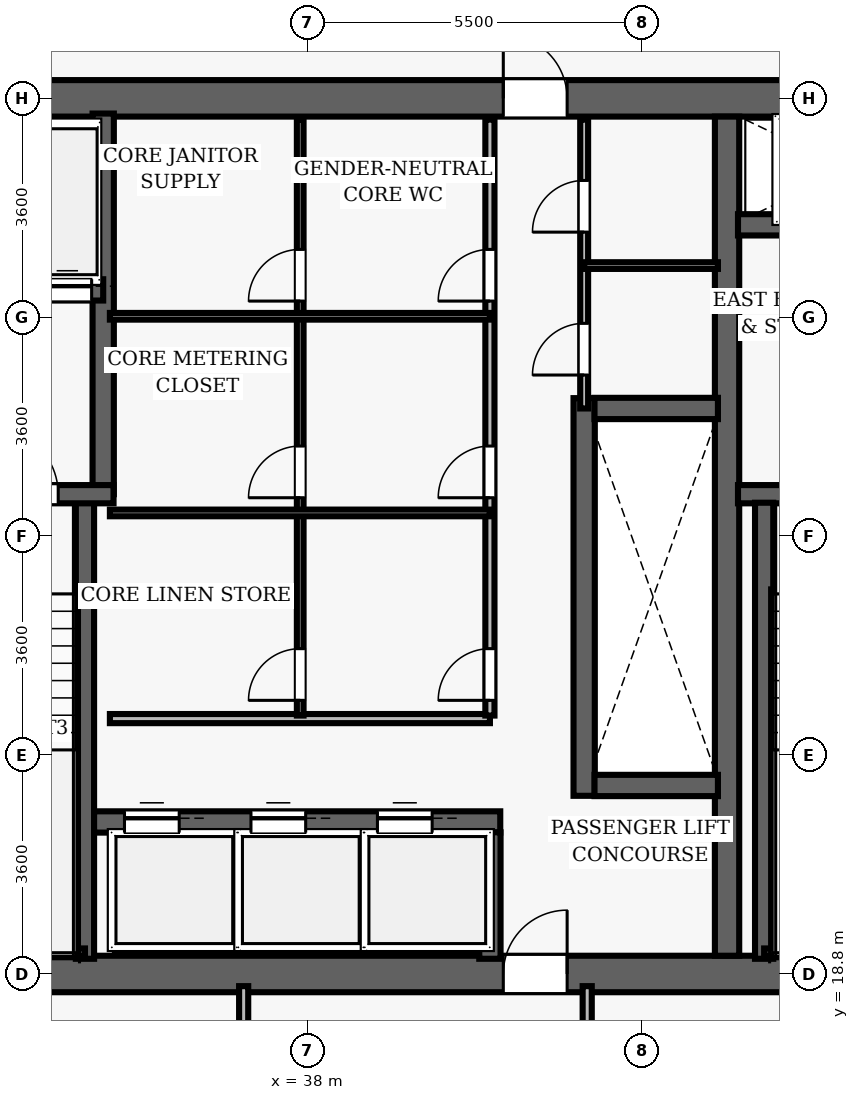
"""IFC4 building model, lengths in metres.
Left out: names, types, materials, properties, quantities, classifications, styles, units other than length and angle.
Written with IfcOpenShell. Run it as: python <this file> out.ifc"""

import sys

from ifc_helpers import new_model, si_unit, direction, frame, frame_2d, origin, place, context, subcontext, project, spatial, rectangle, extrude, element, fill, save


model = new_model("IFC4")
c1 = context("Model", 3, precision=1e-05, world=origin(), true_north=direction((0.0, 1.0)))
c2 = subcontext(c1, "Body", "Model", "MODEL_VIEW")
j1 = project(units=[si_unit("LENGTHUNIT", "METRE"), si_unit("PLANEANGLEUNIT", "RADIAN")], contexts=[c1])
p1 = place(None, origin())
s1 = spatial("IfcSite", under=j1, at=p1, CompositionType="ELEMENT")
p2 = place(p1, origin())
s2 = spatial("IfcBuilding", under=s1, at=p2, CompositionType="ELEMENT")
p3 = place(p2, frame((0.0, 0.0, 155.3)))
s3 = spatial("IfcBuildingStorey", under=s2, at=p3, CompositionType="ELEMENT", Elevation=155.3)
p4 = place(p3, frame((26.7, 18.8, 0.0), z_axis=(0.0, 0.0, 1.0), x_axis=(1.0, 0.0, 0.0)))
e1 = element("IfcWall", 1, at=p4, inside=s3, PredefinedType="SHEAR", context=c2, shape_type="SweptSolid", body=[
    extrude(rectangle(XDim=22.6, YDim=0.6, at=frame_2d((11.3, 0.0))), origin(), (0.0, 0.0, 1.0), 3.5),
])
p5 = place(p4, frame((14.52, 0.0, 0.0)))
e2 = element("IfcOpeningElement", 2, at=p5, cuts=e1, PredefinedType="OPENING", context=c2, shape_type="SweptSolid", body=[
    extrude(rectangle(XDim=1.05, YDim=2.15, at=frame_2d((0.525, 1.075))), frame((0.0, 0.31, 0.0), z_axis=(0.0, -1.0, 0.0), x_axis=(1.0, 0.0, 0.0)), (0.0, 0.0, 1.0), 0.62),
])
p6 = place(p3, frame((26.7, 33.2, 0.0), z_axis=(0.0, 0.0, 1.0), x_axis=(1.0, 0.0, 0.0)))
e3 = element("IfcWall", 3, at=p6, inside=s3, PredefinedType="SHEAR", context=c2, shape_type="SweptSolid", body=[
    extrude(rectangle(XDim=22.6, YDim=0.6, at=frame_2d((11.3, 0.0))), origin(), (0.0, 0.0, 1.0), 3.5),
])
p7 = place(p6, frame((4.62, 0.0, 0.0)))
e4 = element("IfcOpeningElement", 4, at=p7, cuts=e3, PredefinedType="OPENING", context=c2, shape_type="SweptSolid", body=[
    extrude(rectangle(XDim=1.05, YDim=2.15, at=frame_2d((0.525, 1.075))), frame((0.0, 0.31, 0.0), z_axis=(0.0, -1.0, 0.0), x_axis=(1.0, 0.0, 0.0)), (0.0, 0.0, 1.0), 0.62),
])
p8 = place(p6, frame((14.52, 0.0, 0.0)))
e5 = element("IfcOpeningElement", 5, at=p8, cuts=e3, PredefinedType="OPENING", context=c2, shape_type="SweptSolid", body=[
    extrude(rectangle(XDim=1.05, YDim=2.15, at=frame_2d((0.525, 1.075))), frame((0.0, 0.31, 0.0), z_axis=(0.0, -1.0, 0.0), x_axis=(1.0, 0.0, 0.0)), (0.0, 0.0, 1.0), 0.62),
])
p9 = place(p3, frame((44.9, 19.1, 0.0), z_axis=(0.0, 0.0, 1.0), x_axis=(0.0, 1.0, 0.0)))
e6 = element("IfcWall", 6, at=p9, inside=s3, PredefinedType="SHEAR", context=c2, shape_type="SweptSolid", body=[
    extrude(rectangle(XDim=13.8, YDim=0.4, at=frame_2d((6.9, 0.0))), origin(), (0.0, 0.0, 1.0), 3.5),
])
p10 = place(p3, frame((45.08, 26.69, 0.0), z_axis=(0.0, 0.0, 1.0), x_axis=(1.0, 0.0, 0.0)))
e7 = element("IfcWall", 7, at=p10, inside=s3, PredefinedType="SHEAR", context=c2, shape_type="SweptSolid", body=[
    extrude(rectangle(XDim=3.67, YDim=0.3, at=frame_2d((1.835, 0.0))), origin(), (0.0, 0.0, 1.0), 3.5),
])
p11 = place(p10, frame((1.05, 0.0, 0.0)))
e8 = element("IfcOpeningElement", 8, at=p11, cuts=e7, PredefinedType="OPENING", context=c2, shape_type="SweptSolid", body=[
    extrude(rectangle(XDim=1.1, YDim=2.15, at=frame_2d((0.55, 1.075))), frame((0.0, 0.16, 0.0), z_axis=(0.0, -1.0, 0.0), x_axis=(1.0, 0.0, 0.0)), (0.0, 0.0, 1.0), 0.32),
])
p12 = place(p3, frame((45.51, 19.05, 0.0), z_axis=(0.0, 0.0, 1.0), x_axis=(0.0, 1.0, 0.0)))
e9 = element("IfcWall", 9, at=p12, inside=s3, PredefinedType="SHEAR", context=c2, shape_type="SweptSolid", body=[
    extrude(rectangle(XDim=7.5, YDim=0.3, at=frame_2d((3.75, 0.0))), origin(), (0.0, 0.0, 1.0), 3.5),
])
p13 = place(p3, frame((45.51, 19.16, 0.0), z_axis=(0.0, 0.0, 1.0), x_axis=(1.0, 0.0, 0.0)))
e10 = element("IfcWall", 10, at=p13, inside=s3, PredefinedType="SHEAR", context=c2, shape_type="SweptSolid", body=[
    extrude(rectangle(XDim=3.095, YDim=0.12, at=frame_2d((1.547, 0.0))), origin(), (0.0, 0.0, 1.0), 3.5),
])
p14 = place(p3, frame((45.08, 31.12, 0.0), z_axis=(0.0, 0.0, 1.0), x_axis=(1.0, 0.0, 0.0)))
e11 = element("IfcWall", 11, at=p14, inside=s3, PredefinedType="SHEAR", context=c2, shape_type="SweptSolid", body=[
    extrude(rectangle(XDim=3.67, YDim=0.35, at=frame_2d((1.835, 0.0))), origin(), (0.0, 0.0, 1.0), 2.675),
])
p15 = place(p14, frame((1.25, 0.0, 0.0)))
e12 = element("IfcOpeningElement", 12, at=p15, cuts=e11, PredefinedType="OPENING", context=c2, shape_type="SweptSolid", body=[
    extrude(rectangle(XDim=1.1, YDim=2.15, at=frame_2d((0.55, 1.075))), frame((0.0, 0.185, 0.0), z_axis=(0.0, -1.0, 0.0), x_axis=(1.0, 0.0, 0.0)), (0.0, 0.0, 1.0), 0.37),
])
p16 = place(p3, frame((34.34, 19.05, 0.0), z_axis=(0.0, 0.0, 1.0), x_axis=(0.0, 1.0, 0.0)))
e13 = element("IfcWall", 13, at=p16, inside=s3, PredefinedType="SHEAR", context=c2, shape_type="SweptSolid", body=[
    extrude(rectangle(XDim=7.5, YDim=0.3, at=frame_2d((3.75, 0.0))), origin(), (0.0, 0.0, 1.0), 3.5),
])
p17 = place(p3, frame((34.64, 26.69, 0.0), z_axis=(0.0, 0.0, 1.0), x_axis=(0.0, 1.0, 0.0)))
e14 = element("IfcWall", 14, at=p17, inside=s3, PredefinedType="SHEAR", context=c2, shape_type="SweptSolid", body=[
    extrude(rectangle(XDim=6.26, YDim=0.35, at=frame_2d((3.13, 0.0))), origin(), (0.0, 0.0, 1.0), 3.5),
])
p18 = place(p3, frame((31.25, 26.69, 0.0), z_axis=(0.0, 0.0, 1.0), x_axis=(1.0, 0.0, 0.0)))
e15 = element("IfcWall", 15, at=p18, inside=s3, PredefinedType="SHEAR", context=c2, shape_type="SweptSolid", body=[
    extrude(rectangle(XDim=3.56, YDim=0.3, at=frame_2d((1.78, 0.0))), origin(), (0.0, 0.0, 1.0), 3.5),
])
p19 = place(p18, frame((1.55, 0.0, 0.0)))
e16 = element("IfcOpeningElement", 16, at=p19, cuts=e15, PredefinedType="OPENING", context=c2, shape_type="SweptSolid", body=[
    extrude(rectangle(XDim=1.1, YDim=2.15, at=frame_2d((0.55, 1.075))), frame((0.0, 0.16, 0.0), z_axis=(0.0, -1.0, 0.0), x_axis=(1.0, 0.0, 0.0)), (0.0, 0.0, 1.0), 0.32),
])
p20 = place(p3, frame((31.3, 19.16, 0.0), z_axis=(0.0, 0.0, 1.0), x_axis=(1.0, 0.0, 0.0)))
e17 = element("IfcWall", 17, at=p20, inside=s3, PredefinedType="SHEAR", context=c2, shape_type="SweptSolid", body=[
    extrude(rectangle(XDim=3.04, YDim=0.12, at=frame_2d((1.52, 0.0))), origin(), (0.0, 0.0, 1.0), 3.5),
])
p21 = place(p3, frame((32.23, 30.05, 0.0), z_axis=(0.0, 0.0, 1.0), x_axis=(1.0, 0.0, 0.0)))
e18 = element("IfcWall", 18, at=p21, inside=s3, PredefinedType="SHEAR", context=c2, shape_type="SweptSolid", body=[
    extrude(rectangle(XDim=2.41, YDim=0.35, at=frame_2d((1.205, 0.0))), origin(), (0.0, 0.0, 1.0), 2.675),
])
p22 = place(p21, frame((0.42, 0.0, 0.0)))
e19 = element("IfcOpeningElement", 19, at=p22, cuts=e18, PredefinedType="OPENING", context=c2, shape_type="SweptSolid", body=[
    extrude(rectangle(XDim=0.8, YDim=2.15, at=frame_2d((0.4, 1.075))), frame((0.0, 0.185, 0.0), z_axis=(0.0, -1.0, 0.0), x_axis=(1.0, 0.0, 0.0)), (0.0, 0.0, 1.0), 0.37),
])
p23 = place(p21, frame((1.42, 0.0, 0.0)))
e20 = element("IfcOpeningElement", 20, at=p23, cuts=e18, PredefinedType="OPENING", context=c2, shape_type="SweptSolid", body=[
    extrude(rectangle(XDim=0.8, YDim=2.15, at=frame_2d((0.4, 1.075))), frame((0.0, 0.185, 0.0), z_axis=(0.0, -1.0, 0.0), x_axis=(1.0, 0.0, 0.0)), (0.0, 0.0, 1.0), 0.37),
])
p24 = place(p3, frame((42.55, 21.73, 0.0), z_axis=(0.0, 0.0, 1.0), x_axis=(0.0, 1.0, 0.0)))
e21 = element("IfcWall", 21, at=p24, inside=s3, PredefinedType="SHEAR", context=c2, shape_type="SweptSolid", body=[
    extrude(rectangle(XDim=6.54, YDim=0.35, at=frame_2d((3.27, 0.0))), origin(), (0.0, 0.0, 1.0), 2.675),
])
for number, where, z_axis, x_axis in (
    (22, (42.72, 21.9, 0.0), (0.0, 0.0, 1.0), (1.0, 0.0, 0.0)),
    (23, (42.72, 28.1, 0.0), (0.0, 0.0, 1.0), (1.0, 0.0, 0.0)),
):
    element("IfcWall", number, at=place(p3, frame(where, z_axis=z_axis, x_axis=x_axis)), inside=s3, PredefinedType="SHEAR", context=c2, shape_type="SweptSolid", body=[
        extrude(rectangle(XDim=2.03, YDim=0.35, at=frame_2d((1.015, 0.0))), origin(), (0.0, 0.0, 1.0), 2.675),
    ])
p25 = place(p3, frame((34.49, 21.3, 0.0), z_axis=(0.0, 0.0, 1.0), x_axis=(1.0, 0.0, 0.0)))
e24 = element("IfcWall", 24, at=p25, inside=s3, PredefinedType="SHEAR", context=c2, shape_type="SweptSolid", body=[
    extrude(rectangle(XDim=6.68, YDim=0.35, at=frame_2d((3.34, 0.0))), origin(), (0.0, 0.0, 1.0), 2.675),
])
p26 = place(p25, frame((0.5, 0.0, 0.0)))
e25 = element("IfcOpeningElement", 25, at=p26, cuts=e24, PredefinedType="OPENING", context=c2, shape_type="SweptSolid", body=[
    extrude(rectangle(XDim=0.9, YDim=2.15, at=frame_2d((0.45, 1.075))), frame((0.0, 0.185, 0.0), z_axis=(0.0, -1.0, 0.0), x_axis=(1.0, 0.0, 0.0)), (0.0, 0.0, 1.0), 0.37),
])
p27 = place(p25, frame((2.58, 0.0, 0.0)))
e26 = element("IfcOpeningElement", 26, at=p27, cuts=e24, PredefinedType="OPENING", context=c2, shape_type="SweptSolid", body=[
    extrude(rectangle(XDim=0.9, YDim=2.15, at=frame_2d((0.45, 1.075))), frame((0.0, 0.185, 0.0), z_axis=(0.0, -1.0, 0.0), x_axis=(1.0, 0.0, 0.0)), (0.0, 0.0, 1.0), 0.37),
])
p28 = place(p25, frame((4.66, 0.0, 0.0)))
e27 = element("IfcOpeningElement", 27, at=p28, cuts=e24, PredefinedType="OPENING", context=c2, shape_type="SweptSolid", body=[
    extrude(rectangle(XDim=0.9, YDim=2.15, at=frame_2d((0.45, 1.075))), frame((0.0, 0.185, 0.0), z_axis=(0.0, -1.0, 0.0), x_axis=(1.0, 0.0, 0.0)), (0.0, 0.0, 1.0), 0.37),
])
p29 = place(p3, frame((41.0, 19.05, 0.0), z_axis=(0.0, 0.0, 1.0), x_axis=(0.0, 1.0, 0.0)))
e28 = element("IfcWall", 28, at=p29, inside=s3, PredefinedType="SHEAR", context=c2, shape_type="SweptSolid", body=[
    extrude(rectangle(XDim=2.08, YDim=0.35, at=frame_2d((1.04, 0.0))), origin(), (0.0, 0.0, 1.0), 2.675),
])
p30 = place(p3, frame((34.75, 23.0, 0.0), z_axis=(0.0, 0.0, 1.0), x_axis=(1.0, 0.0, 0.0)))
e29 = element("IfcWall", 29, at=p30, inside=s3, PredefinedType="PARTITIONING", context=c2, shape_type="SweptSolid", body=[
    extrude(rectangle(XDim=6.25, YDim=0.15, at=frame_2d((3.125, 0.0))), origin(), (0.0, 0.0, 1.0), 2.675),
])
p31 = place(p3, frame((41.0, 23.05, 0.0), z_axis=(0.0, 0.0, 1.0), x_axis=(0.0, 1.0, 0.0)))
e30 = element("IfcWall", 30, at=p31, inside=s3, PredefinedType="PARTITIONING", context=c2, shape_type="SweptSolid", body=[
    extrude(rectangle(XDim=9.8, YDim=0.15, at=frame_2d((4.9, 0.0))), origin(), (0.0, 0.0, 1.0), 2.675),
])
p32 = place(p31, frame((0.25, 0.0, 0.0)))
e31 = element("IfcOpeningElement", 31, at=p32, cuts=e30, PredefinedType="OPENING", context=c2, shape_type="SweptSolid", body=[
    extrude(rectangle(XDim=0.85, YDim=2.1, at=frame_2d((0.425, 1.05))), frame((0.0, 0.085, 0.0), z_axis=(0.0, -1.0, 0.0), x_axis=(1.0, 0.0, 0.0)), (0.0, 0.0, 1.0), 0.17),
])
p33 = place(p31, frame((3.582, 0.0, 0.0)))
e32 = element("IfcOpeningElement", 32, at=p33, cuts=e30, PredefinedType="OPENING", context=c2, shape_type="SweptSolid", body=[
    extrude(rectangle(XDim=0.85, YDim=2.1, at=frame_2d((0.425, 1.05))), frame((0.0, 0.085, 0.0), z_axis=(0.0, -1.0, 0.0), x_axis=(1.0, 0.0, 0.0)), (0.0, 0.0, 1.0), 0.17),
])
p34 = place(p31, frame((6.816, 0.0, 0.0)))
e33 = element("IfcOpeningElement", 33, at=p34, cuts=e30, PredefinedType="OPENING", context=c2, shape_type="SweptSolid", body=[
    extrude(rectangle(XDim=0.85, YDim=2.1, at=frame_2d((0.425, 1.05))), frame((0.0, 0.085, 0.0), z_axis=(0.0, -1.0, 0.0), x_axis=(1.0, 0.0, 0.0)), (0.0, 0.0, 1.0), 0.17),
])
p35 = place(p3, frame((37.88, 23.05, 0.0), z_axis=(0.0, 0.0, 1.0), x_axis=(0.0, 1.0, 0.0)))
e34 = element("IfcWall", 34, at=p35, inside=s3, PredefinedType="PARTITIONING", context=c2, shape_type="SweptSolid", body=[
    extrude(rectangle(XDim=9.8, YDim=0.11, at=frame_2d((4.9, 0.0))), origin(), (0.0, 0.0, 1.0), 2.675),
])
p36 = place(p35, frame((0.25, 0.0, 0.0)))
e35 = element("IfcOpeningElement", 35, at=p36, cuts=e34, PredefinedType="OPENING", context=c2, shape_type="SweptSolid", body=[
    extrude(rectangle(XDim=0.85, YDim=2.1, at=frame_2d((0.425, 1.05))), frame((0.0, 0.065, 0.0), z_axis=(0.0, -1.0, 0.0), x_axis=(1.0, 0.0, 0.0)), (0.0, 0.0, 1.0), 0.13),
])
p37 = place(p35, frame((3.582, 0.0, 0.0)))
e36 = element("IfcOpeningElement", 36, at=p37, cuts=e34, PredefinedType="OPENING", context=c2, shape_type="SweptSolid", body=[
    extrude(rectangle(XDim=0.85, YDim=2.1, at=frame_2d((0.425, 1.05))), frame((0.0, 0.065, 0.0), z_axis=(0.0, -1.0, 0.0), x_axis=(1.0, 0.0, 0.0)), (0.0, 0.0, 1.0), 0.13),
])
p38 = place(p35, frame((6.816, 0.0, 0.0)))
e37 = element("IfcOpeningElement", 37, at=p38, cuts=e34, PredefinedType="OPENING", context=c2, shape_type="SweptSolid", body=[
    extrude(rectangle(XDim=0.85, YDim=2.1, at=frame_2d((0.425, 1.05))), frame((0.0, 0.065, 0.0), z_axis=(0.0, -1.0, 0.0), x_axis=(1.0, 0.0, 0.0)), (0.0, 0.0, 1.0), 0.13),
])
for number, where, z_axis, x_axis in (
    (38, (34.75, 26.382, 0.0), (0.0, 0.0, 1.0), (1.0, 0.0, 0.0)),
    (39, (34.75, 29.616, 0.0), (0.0, 0.0, 1.0), (1.0, 0.0, 0.0)),
):
    element("IfcWall", number, at=place(p3, frame(where, z_axis=z_axis, x_axis=x_axis)), inside=s3, PredefinedType="PARTITIONING", context=c2, shape_type="SweptSolid", body=[
        extrude(rectangle(XDim=6.25, YDim=0.11, at=frame_2d((3.125, 0.0))), origin(), (0.0, 0.0, 1.0), 2.675),
    ])
p39 = place(p3, frame((42.55, 28.1, 0.0), z_axis=(0.0, 0.0, 1.0), x_axis=(0.0, 1.0, 0.0)))
e40 = element("IfcWall", 40, at=p39, inside=s3, PredefinedType="PARTITIONING", context=c2, shape_type="SweptSolid", body=[
    extrude(rectangle(XDim=4.75, YDim=0.13, at=frame_2d((2.375, 0.0))), origin(), (0.0, 0.0, 1.0), 2.675),
])
p40 = place(p39, frame((0.55, 0.0, 0.0)))
e41 = element("IfcOpeningElement", 41, at=p40, cuts=e40, PredefinedType="OPENING", context=c2, shape_type="SweptSolid", body=[
    extrude(rectangle(XDim=0.85, YDim=2.1, at=frame_2d((0.425, 1.05))), frame((0.0, 0.075, 0.0), z_axis=(0.0, -1.0, 0.0), x_axis=(1.0, 0.0, 0.0)), (0.0, 0.0, 1.0), 0.15),
])
p41 = place(p39, frame((2.9, 0.0, 0.0)))
e42 = element("IfcOpeningElement", 42, at=p41, cuts=e40, PredefinedType="OPENING", context=c2, shape_type="SweptSolid", body=[
    extrude(rectangle(XDim=0.85, YDim=2.1, at=frame_2d((0.425, 1.05))), frame((0.0, 0.075, 0.0), z_axis=(0.0, -1.0, 0.0), x_axis=(1.0, 0.0, 0.0)), (0.0, 0.0, 1.0), 0.15),
])
p42 = place(p3, frame((42.55, 30.45, 0.0), z_axis=(0.0, 0.0, 1.0), x_axis=(1.0, 0.0, 0.0)))
e43 = element("IfcWall", 43, at=p42, inside=s3, PredefinedType="PARTITIONING", context=c2, shape_type="SweptSolid", body=[
    extrude(rectangle(XDim=2.2, YDim=0.11, at=frame_2d((1.1, 0.0))), origin(), (0.0, 0.0, 1.0), 2.675),
])
p43 = place(p3, frame((36.95, 11.2, 0.0), z_axis=(0.0, 0.0, 1.0), x_axis=(0.0, 1.0, 0.0)))
e44 = element("IfcWall", 44, at=p43, inside=s3, PredefinedType="PARTITIONING", context=c2, shape_type="SweptSolid", body=[
    extrude(rectangle(XDim=7.4, YDim=0.15, at=frame_2d((3.7, 0.0))), origin(), (0.0, 0.0, 1.0), 2.675),
])
p44 = place(p43, frame((5.075, 0.0, 0.0)))
e45 = element("IfcOpeningElement", 45, at=p44, cuts=e44, PredefinedType="OPENING", context=c2, shape_type="SweptSolid", body=[
    extrude(rectangle(XDim=0.95, YDim=2.15, at=frame_2d((0.475, 1.075))), frame((0.0, 0.085, 0.0), z_axis=(0.0, -1.0, 0.0), x_axis=(1.0, 0.0, 0.0)), (0.0, 0.0, 1.0), 0.17),
])
p45 = place(p3, frame((42.6, 16.65, 0.0), z_axis=(0.0, 0.0, 1.0), x_axis=(0.0, 1.0, 0.0)))
e46 = element("IfcWall", 46, at=p45, inside=s3, PredefinedType="PARTITIONING", context=c2, shape_type="SweptSolid", body=[
    extrude(rectangle(XDim=1.95, YDim=0.15, at=frame_2d((0.975, 0.0))), origin(), (0.0, 0.0, 1.0), 2.675),
])
p46 = place(p19, origin())
e47 = element("IfcDoor", 47, at=p46, inside=s3, OperationType="SINGLE_SWING_LEFT", PredefinedType="DOOR", context=c2, shape_type="SweptSolid", body=[
    extrude(rectangle(XDim=1.1, YDim=2.15, at=frame_2d((0.55, 1.075))), frame((0.0, 0.025, 0.0), z_axis=(0.0, -1.0, 0.0), x_axis=(1.0, 0.0, 0.0)), (0.0, 0.0, 1.0), 0.05),
])
fill(e16, e47)
p47 = place(p8, origin())
e48 = element("IfcDoor", 48, at=p47, inside=s3, OperationType="SINGLE_SWING_LEFT", PredefinedType="DOOR", context=c2, shape_type="SweptSolid", body=[
    extrude(rectangle(XDim=1.05, YDim=2.15, at=frame_2d((0.525, 1.075))), frame((0.0, 0.025, 0.0), z_axis=(0.0, -1.0, 0.0), x_axis=(1.0, 0.0, 0.0)), (0.0, 0.0, 1.0), 0.05),
])
fill(e5, e48)
p48 = place(p5, origin())
e49 = element("IfcDoor", 49, at=p48, inside=s3, OperationType="SINGLE_SWING_RIGHT", PredefinedType="DOOR", context=c2, shape_type="SweptSolid", body=[
    extrude(rectangle(XDim=1.05, YDim=2.15, at=frame_2d((0.525, 1.075))), frame((0.0, 0.025, 0.0), z_axis=(0.0, -1.0, 0.0), x_axis=(1.0, 0.0, 0.0)), (0.0, 0.0, 1.0), 0.05),
])
fill(e2, e49)
p49 = place(p32, origin())
e50 = element("IfcDoor", 50, at=p49, inside=s3, OperationType="SINGLE_SWING_LEFT", PredefinedType="DOOR", context=c2, shape_type="SweptSolid", body=[
    extrude(rectangle(XDim=0.85, YDim=2.1, at=frame_2d((0.425, 1.05))), frame((0.0, 0.025, 0.0), z_axis=(0.0, -1.0, 0.0), x_axis=(1.0, 0.0, 0.0)), (0.0, 0.0, 1.0), 0.05),
])
fill(e31, e50)
p50 = place(p36, origin())
e51 = element("IfcDoor", 51, at=p50, inside=s3, OperationType="SINGLE_SWING_LEFT", PredefinedType="DOOR", context=c2, shape_type="SweptSolid", body=[
    extrude(rectangle(XDim=0.85, YDim=2.1, at=frame_2d((0.425, 1.05))), frame((0.0, 0.025, 0.0), z_axis=(0.0, -1.0, 0.0), x_axis=(1.0, 0.0, 0.0)), (0.0, 0.0, 1.0), 0.05),
])
fill(e35, e51)
p51 = place(p33, origin())
e52 = element("IfcDoor", 52, at=p51, inside=s3, OperationType="SINGLE_SWING_LEFT", PredefinedType="DOOR", context=c2, shape_type="SweptSolid", body=[
    extrude(rectangle(XDim=0.85, YDim=2.1, at=frame_2d((0.425, 1.05))), frame((0.0, 0.025, 0.0), z_axis=(0.0, -1.0, 0.0), x_axis=(1.0, 0.0, 0.0)), (0.0, 0.0, 1.0), 0.05),
])
fill(e32, e52)
p52 = place(p37, origin())
e53 = element("IfcDoor", 53, at=p52, inside=s3, OperationType="SINGLE_SWING_LEFT", PredefinedType="DOOR", context=c2, shape_type="SweptSolid", body=[
    extrude(rectangle(XDim=0.85, YDim=2.1, at=frame_2d((0.425, 1.05))), frame((0.0, 0.025, 0.0), z_axis=(0.0, -1.0, 0.0), x_axis=(1.0, 0.0, 0.0)), (0.0, 0.0, 1.0), 0.05),
])
fill(e36, e53)
p53 = place(p34, origin())
e54 = element("IfcDoor", 54, at=p53, inside=s3, OperationType="SINGLE_SWING_LEFT", PredefinedType="DOOR", context=c2, shape_type="SweptSolid", body=[
    extrude(rectangle(XDim=0.85, YDim=2.1, at=frame_2d((0.425, 1.05))), frame((0.0, 0.025, 0.0), z_axis=(0.0, -1.0, 0.0), x_axis=(1.0, 0.0, 0.0)), (0.0, 0.0, 1.0), 0.05),
])
fill(e33, e54)
p54 = place(p38, origin())
e55 = element("IfcDoor", 55, at=p54, inside=s3, OperationType="SINGLE_SWING_LEFT", PredefinedType="DOOR", context=c2, shape_type="SweptSolid", body=[
    extrude(rectangle(XDim=0.85, YDim=2.1, at=frame_2d((0.425, 1.05))), frame((0.0, 0.025, 0.0), z_axis=(0.0, -1.0, 0.0), x_axis=(1.0, 0.0, 0.0)), (0.0, 0.0, 1.0), 0.05),
])
fill(e37, e55)
p55 = place(p40, origin())
e56 = element("IfcDoor", 56, at=p55, inside=s3, OperationType="SINGLE_SWING_LEFT", PredefinedType="DOOR", context=c2, shape_type="SweptSolid", body=[
    extrude(rectangle(XDim=0.85, YDim=2.1, at=frame_2d((0.425, 1.05))), frame((0.0, 0.025, 0.0), z_axis=(0.0, -1.0, 0.0), x_axis=(1.0, 0.0, 0.0)), (0.0, 0.0, 1.0), 0.05),
])
fill(e41, e56)
p56 = place(p41, origin())
e57 = element("IfcDoor", 57, at=p56, inside=s3, OperationType="SINGLE_SWING_LEFT", PredefinedType="DOOR", context=c2, shape_type="SweptSolid", body=[
    extrude(rectangle(XDim=0.85, YDim=2.1, at=frame_2d((0.425, 1.05))), frame((0.0, 0.025, 0.0), z_axis=(0.0, -1.0, 0.0), x_axis=(1.0, 0.0, 0.0)), (0.0, 0.0, 1.0), 0.05),
])
fill(e42, e57)
p57 = place(p26, origin())
e58 = element("IfcDoor", 58, at=p57, inside=s3, OperationType="SLIDING_TO_LEFT", PredefinedType="DOOR", context=c2, shape_type="SweptSolid", body=[
    extrude(rectangle(XDim=0.9, YDim=2.15, at=frame_2d((0.45, 1.075))), frame((0.0, 0.025, 0.0), z_axis=(0.0, -1.0, 0.0), x_axis=(1.0, 0.0, 0.0)), (0.0, 0.0, 1.0), 0.05),
])
fill(e25, e58)
p58 = place(p27, origin())
e59 = element("IfcDoor", 59, at=p58, inside=s3, OperationType="SLIDING_TO_LEFT", PredefinedType="DOOR", context=c2, shape_type="SweptSolid", body=[
    extrude(rectangle(XDim=0.9, YDim=2.15, at=frame_2d((0.45, 1.075))), frame((0.0, 0.025, 0.0), z_axis=(0.0, -1.0, 0.0), x_axis=(1.0, 0.0, 0.0)), (0.0, 0.0, 1.0), 0.05),
])
fill(e26, e59)
p59 = place(p28, origin())
e60 = element("IfcDoor", 60, at=p59, inside=s3, OperationType="SLIDING_TO_LEFT", PredefinedType="DOOR", context=c2, shape_type="SweptSolid", body=[
    extrude(rectangle(XDim=0.9, YDim=2.15, at=frame_2d((0.45, 1.075))), frame((0.0, 0.025, 0.0), z_axis=(0.0, -1.0, 0.0), x_axis=(1.0, 0.0, 0.0)), (0.0, 0.0, 1.0), 0.05),
])
fill(e27, e60)
p60 = place(p23, origin())
e61 = element("IfcDoor", 61, at=p60, inside=s3, OperationType="SLIDING_TO_LEFT", PredefinedType="DOOR", context=c2, shape_type="SweptSolid", body=[
    extrude(rectangle(XDim=0.8, YDim=2.15, at=frame_2d((0.4, 1.075))), frame((0.0, 0.025, 0.0), z_axis=(0.0, -1.0, 0.0), x_axis=(1.0, 0.0, 0.0)), (0.0, 0.0, 1.0), 0.05),
])
fill(e20, e61)
save(model, sys.argv[1])
